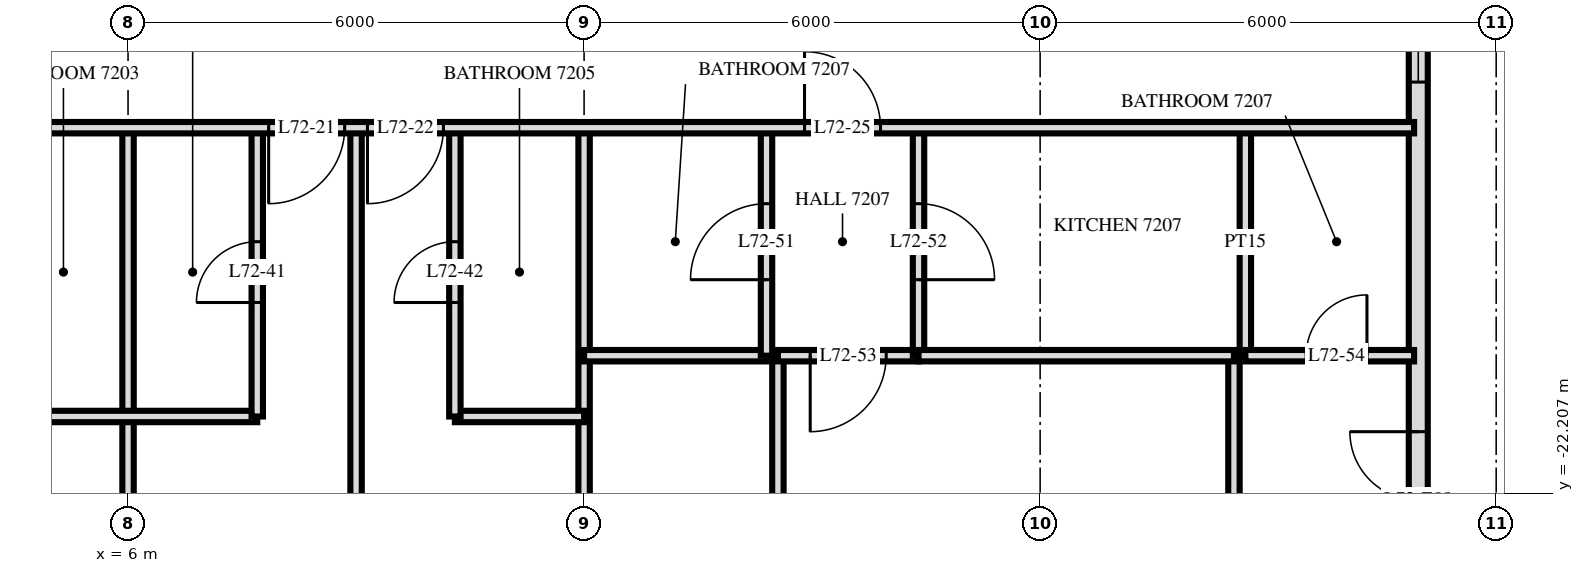
"""IFC4 building model, lengths in metres.
Left out: names, types, materials, properties, quantities, classifications, styles, units other than length and angle.
Written with IfcOpenShell. Run it as: python <this file> out.ifc"""

import sys

from ifc_helpers import new_model, si_unit, direction, frame, frame_2d, origin, place, context, subcontext, project, spatial, rectangle, extrude, element, fill, save


model = new_model("IFC4")
c1 = context("Model", 3, precision=1e-05, world=origin(), true_north=direction((0.0, 1.0)))
c2 = subcontext(c1, "Body", "Model", "MODEL_VIEW")
j1 = project(units=[si_unit("LENGTHUNIT", "METRE"), si_unit("PLANEANGLEUNIT", "RADIAN")], contexts=[c1])
p1 = place(None, origin())
s1 = spatial("IfcSite", under=j1, at=p1, CompositionType="ELEMENT")
p2 = place(p1, origin())
s2 = spatial("IfcBuilding", under=s1, at=p2, CompositionType="ELEMENT")
p3 = place(p2, frame((0.0, 0.0, 273.6)))
s3 = spatial("IfcBuildingStorey", under=s2, at=p3, CompositionType="ELEMENT", Elevation=273.6)
p4 = place(p3, frame((22.975, -29.275, 0.0), z_axis=(0.0, 0.0, 1.0), x_axis=(0.0, 1.0, 0.0)))
e1 = element("IfcWall", 1, at=p4, inside=s3, PredefinedType="SOLIDWALL", context=c2, shape_type="SweptSolid", body=[
    extrude(rectangle(XDim=25.951, YDim=0.25, at=frame_2d((12.975, 0.0))), origin(), (0.0, 0.0, 1.0), 3.22),
])
p5 = place(p4, frame((0.575, 0.0, 0.0)))
e2 = element("IfcOpeningElement", 2, at=p5, cuts=e1, PredefinedType="OPENING", context=c2, shape_type="SweptSolid", body=[
    extrude(rectangle(XDim=1.8, YDim=2.4, at=frame_2d((0.9, 1.2))), frame((0.0, 0.135, 0.0), z_axis=(0.0, -1.0, 0.0), x_axis=(1.0, 0.0, 0.0)), (0.0, 0.0, 1.0), 0.27),
])
p6 = place(p4, frame((3.325, 0.0, 0.9)))
e3 = element("IfcOpeningElement", 3, at=p6, cuts=e1, PredefinedType="OPENING", context=c2, shape_type="SweptSolid", body=[
    extrude(rectangle(XDim=1.8, YDim=1.5, at=frame_2d((0.9, 0.75))), frame((0.0, 0.135, 0.0), z_axis=(0.0, -1.0, 0.0), x_axis=(1.0, 0.0, 0.0)), (0.0, 0.0, 1.0), 0.27),
])
p7 = place(p4, frame((6.075, 0.0, 0.0)))
e4 = element("IfcOpeningElement", 4, at=p7, cuts=e1, PredefinedType="OPENING", context=c2, shape_type="SweptSolid", body=[
    extrude(rectangle(XDim=1.8, YDim=2.4, at=frame_2d((0.9, 1.2))), frame((0.0, 0.135, 0.0), z_axis=(0.0, -1.0, 0.0), x_axis=(1.0, 0.0, 0.0)), (0.0, 0.0, 1.0), 0.27),
])
p8 = place(p4, frame((12.475, 0.0, 0.9)))
e5 = element("IfcOpeningElement", 5, at=p8, cuts=e1, PredefinedType="OPENING", context=c2, shape_type="SweptSolid", body=[
    extrude(rectangle(XDim=1.2, YDim=1.5, at=frame_2d((0.6, 0.75))), frame((0.0, 0.135, 0.0), z_axis=(0.0, -1.0, 0.0), x_axis=(1.0, 0.0, 0.0)), (0.0, 0.0, 1.0), 0.27),
])
p9 = place(p4, frame((16.175, 0.0, 0.0)))
e6 = element("IfcOpeningElement", 6, at=p9, cuts=e1, PredefinedType="OPENING", context=c2, shape_type="SweptSolid", body=[
    extrude(rectangle(XDim=1.8, YDim=2.4, at=frame_2d((0.9, 1.2))), frame((0.0, 0.135, 0.0), z_axis=(0.0, -1.0, 0.0), x_axis=(1.0, 0.0, 0.0)), (0.0, 0.0, 1.0), 0.27),
])
p10 = place(p4, frame((20.925, 0.0, 0.0)))
e7 = element("IfcOpeningElement", 7, at=p10, cuts=e1, PredefinedType="OPENING", context=c2, shape_type="SweptSolid", body=[
    extrude(rectangle(XDim=1.8, YDim=2.4, at=frame_2d((0.9, 1.2))), frame((0.0, 0.135, 0.0), z_axis=(0.0, -1.0, 0.0), x_axis=(1.0, 0.0, 0.0)), (0.0, 0.0, 1.0), 0.27),
])
p11 = place(p3, frame((20.7, -20.4, 0.0), z_axis=(0.0, 0.0, 1.0), x_axis=(0.0, 1.0, 0.0)))
e8 = element("IfcWall", 8, at=p11, inside=s3, PredefinedType="PARTITIONING", context=c2, shape_type="SweptSolid", body=[
    extrude(rectangle(XDim=3.0, YDim=0.15, at=frame_2d((1.5, 0.0))), origin(), (0.0, 0.0, 1.0), 3.22),
])
p12 = place(p3, frame((20.55, -33.017, 0.0), z_axis=(0.0, 0.0, 1.0), x_axis=(0.0, 1.0, 0.0)))
e9 = element("IfcWall", 9, at=p12, inside=s3, PredefinedType="PARTITIONING", context=c2, shape_type="SweptSolid", body=[
    extrude(rectangle(XDim=12.617, YDim=0.15, at=frame_2d((6.308, 0.0))), origin(), (0.0, 0.0, 1.0), 3.22),
])
p13 = place(p12, frame((5.697, 0.0, 0.0)))
e10 = element("IfcOpeningElement", 10, at=p13, cuts=e9, PredefinedType="OPENING", context=c2, shape_type="SweptSolid", body=[
    extrude(rectangle(XDim=0.9, YDim=2.1, at=frame_2d((0.45, 1.05))), frame((0.0, 0.085, 0.0), z_axis=(0.0, -1.0, 0.0), x_axis=(1.0, 0.0, 0.0)), (0.0, 0.0, 1.0), 0.17),
])
p14 = place(p3, frame((16.4, -20.4, 0.0), z_axis=(0.0, 0.0, 1.0), x_axis=(0.0, 1.0, 0.0)))
e11 = element("IfcWall", 11, at=p14, inside=s3, PredefinedType="PARTITIONING", context=c2, shape_type="SweptSolid", body=[
    extrude(rectangle(XDim=3.0, YDim=0.15, at=frame_2d((1.5, 0.0))), origin(), (0.0, 0.0, 1.0), 3.22),
])
p15 = place(p14, frame((1.0, 0.0, 0.0)))
e12 = element("IfcOpeningElement", 12, at=p15, cuts=e11, PredefinedType="OPENING", context=c2, shape_type="SweptSolid", body=[
    extrude(rectangle(XDim=1.0, YDim=2.1, at=frame_2d((0.5, 1.05))), frame((0.0, 0.085, 0.0), z_axis=(0.0, -1.0, 0.0), x_axis=(1.0, 0.0, 0.0)), (0.0, 0.0, 1.0), 0.17),
])
p16 = place(p3, frame((14.55, -33.62, 0.0), z_axis=(0.0, 0.0, 1.0), x_axis=(0.0, 1.0, 0.0)))
e13 = element("IfcWall", 13, at=p16, inside=s3, PredefinedType="PARTITIONING", context=c2, shape_type="SweptSolid", body=[
    extrude(rectangle(XDim=13.22, YDim=0.15, at=frame_2d((6.61, 0.0))), origin(), (0.0, 0.0, 1.0), 3.22),
])
p17 = place(p16, frame((6.07, 0.0, 0.0)))
e14 = element("IfcOpeningElement", 14, at=p17, cuts=e13, PredefinedType="OPENING", context=c2, shape_type="SweptSolid", body=[
    extrude(rectangle(XDim=0.9, YDim=2.1, at=frame_2d((0.45, 1.05))), frame((0.0, 0.085, 0.0), z_axis=(0.0, -1.0, 0.0), x_axis=(1.0, 0.0, 0.0)), (0.0, 0.0, 1.0), 0.17),
])
p18 = place(p3, frame((14.4, -20.4, 0.0), z_axis=(0.0, 0.0, 1.0), x_axis=(0.0, 1.0, 0.0)))
e15 = element("IfcWall", 15, at=p18, inside=s3, PredefinedType="PARTITIONING", context=c2, shape_type="SweptSolid", body=[
    extrude(rectangle(XDim=3.0, YDim=0.15, at=frame_2d((1.5, 0.0))), origin(), (0.0, 0.0, 1.0), 3.22),
])
p19 = place(p18, frame((1.0, 0.0, 0.0)))
e16 = element("IfcOpeningElement", 16, at=p19, cuts=e15, PredefinedType="OPENING", context=c2, shape_type="SweptSolid", body=[
    extrude(rectangle(XDim=1.0, YDim=2.1, at=frame_2d((0.5, 1.05))), frame((0.0, 0.085, 0.0), z_axis=(0.0, -1.0, 0.0), x_axis=(1.0, 0.0, 0.0)), (0.0, 0.0, 1.0), 0.17),
])
p20 = place(p3, frame((12.0, -33.62, 0.0), z_axis=(0.0, 0.0, 1.0), x_axis=(0.0, 1.0, 0.0)))
e17 = element("IfcWall", 17, at=p20, inside=s3, PredefinedType="PARTITIONING", context=c2, shape_type="SweptSolid", body=[
    extrude(rectangle(XDim=16.22, YDim=0.15, at=frame_2d((8.11, 0.0))), origin(), (0.0, 0.0, 1.0), 3.22),
])
p21 = place(p3, frame((10.3, -21.2, 0.0), z_axis=(0.0, 0.0, 1.0), x_axis=(0.0, 1.0, 0.0)))
e18 = element("IfcWall", 18, at=p21, inside=s3, PredefinedType="PARTITIONING", context=c2, shape_type="SweptSolid", body=[
    extrude(rectangle(XDim=3.8, YDim=0.15, at=frame_2d((1.9, 0.0))), origin(), (0.0, 0.0, 1.0), 3.22),
])
p22 = place(p21, frame((1.5, 0.0, 0.0)))
e19 = element("IfcOpeningElement", 19, at=p22, cuts=e18, PredefinedType="OPENING", context=c2, shape_type="SweptSolid", body=[
    extrude(rectangle(XDim=0.8, YDim=2.1, at=frame_2d((0.4, 1.05))), frame((0.0, 0.085, 0.0), z_axis=(0.0, -1.0, 0.0), x_axis=(1.0, 0.0, 0.0)), (0.0, 0.0, 1.0), 0.17),
])
p23 = place(p3, frame((9.0, -33.62, 0.0), z_axis=(0.0, 0.0, 1.0), x_axis=(0.0, 1.0, 0.0)))
e20 = element("IfcWall", 20, at=p23, inside=s3, PredefinedType="PARTITIONING", context=c2, shape_type="SweptSolid", body=[
    extrude(rectangle(XDim=16.22, YDim=0.15, at=frame_2d((8.11, 0.0))), origin(), (0.0, 0.0, 1.0), 3.22),
])
p24 = place(p3, frame((7.7, -21.2, 0.0), z_axis=(0.0, 0.0, 1.0), x_axis=(0.0, 1.0, 0.0)))
e21 = element("IfcWall", 21, at=p24, inside=s3, PredefinedType="PARTITIONING", context=c2, shape_type="SweptSolid", body=[
    extrude(rectangle(XDim=3.8, YDim=0.15, at=frame_2d((1.9, 0.0))), origin(), (0.0, 0.0, 1.0), 3.22),
])
p25 = place(p24, frame((1.5, 0.0, 0.0)))
e22 = element("IfcOpeningElement", 22, at=p25, cuts=e21, PredefinedType="OPENING", context=c2, shape_type="SweptSolid", body=[
    extrude(rectangle(XDim=0.8, YDim=2.1, at=frame_2d((0.4, 1.05))), frame((0.0, 0.085, 0.0), z_axis=(0.0, -1.0, 0.0), x_axis=(1.0, 0.0, 0.0)), (0.0, 0.0, 1.0), 0.17),
])
p26 = place(p3, frame((6.0, -33.62, 0.0), z_axis=(0.0, 0.0, 1.0), x_axis=(0.0, 1.0, 0.0)))
e23 = element("IfcWall", 23, at=p26, inside=s3, PredefinedType="PARTITIONING", context=c2, shape_type="SweptSolid", body=[
    extrude(rectangle(XDim=16.22, YDim=0.15, at=frame_2d((8.11, 0.0))), origin(), (0.0, 0.0, 1.0), 3.22),
])
p27 = place(p3, frame((4.3, -21.2, 0.0), z_axis=(0.0, 0.0, 1.0), x_axis=(1.0, 0.0, 0.0)))
e24 = element("IfcWall", 24, at=p27, inside=s3, PredefinedType="PARTITIONING", context=c2, shape_type="SweptSolid", body=[
    extrude(rectangle(XDim=3.4, YDim=0.15, at=frame_2d((1.7, 0.0))), origin(), (0.0, 0.0, 1.0), 3.22),
])
p28 = place(p3, frame((10.3, -21.2, 0.0), z_axis=(0.0, 0.0, 1.0), x_axis=(1.0, 0.0, 0.0)))
e25 = element("IfcWall", 25, at=p28, inside=s3, PredefinedType="PARTITIONING", context=c2, shape_type="SweptSolid", body=[
    extrude(rectangle(XDim=1.7, YDim=0.15, at=frame_2d((0.85, 0.0))), origin(), (0.0, 0.0, 1.0), 3.22),
])
p29 = place(p3, frame((14.55, -20.4, 0.0), z_axis=(0.0, 0.0, 1.0), x_axis=(1.0, 0.0, 0.0)))
e26 = element("IfcWall", 26, at=p29, inside=s3, PredefinedType="PARTITIONING", context=c2, shape_type="SweptSolid", body=[
    extrude(rectangle(XDim=1.85, YDim=0.15, at=frame_2d((0.925, 0.0))), origin(), (0.0, 0.0, 1.0), 3.22),
])
p30 = place(p29, frame((0.425, 0.0, 0.0)))
e27 = element("IfcOpeningElement", 27, at=p30, cuts=e26, PredefinedType="OPENING", context=c2, shape_type="SweptSolid", body=[
    extrude(rectangle(XDim=1.0, YDim=2.1, at=frame_2d((0.5, 1.05))), frame((0.0, 0.085, 0.0), z_axis=(0.0, -1.0, 0.0), x_axis=(1.0, 0.0, 0.0)), (0.0, 0.0, 1.0), 0.17),
])
p31 = place(p3, frame((12.0, -20.4, 0.0), z_axis=(0.0, 0.0, 1.0), x_axis=(1.0, 0.0, 0.0)))
e28 = element("IfcWall", 28, at=p31, inside=s3, PredefinedType="PARTITIONING", context=c2, shape_type="SweptSolid", body=[
    extrude(rectangle(XDim=2.4, YDim=0.15, at=frame_2d((1.2, 0.0))), origin(), (0.0, 0.0, 1.0), 3.22),
])
p32 = place(p3, frame((16.4, -20.4, 0.0), z_axis=(0.0, 0.0, 1.0), x_axis=(1.0, 0.0, 0.0)))
e29 = element("IfcWall", 29, at=p32, inside=s3, PredefinedType="PARTITIONING", context=c2, shape_type="SweptSolid", body=[
    extrude(rectangle(XDim=4.15, YDim=0.15, at=frame_2d((2.075, 0.0))), origin(), (0.0, 0.0, 1.0), 3.22),
])
p33 = place(p3, frame((20.7, -20.4, 0.0), z_axis=(0.0, 0.0, 1.0), x_axis=(1.0, 0.0, 0.0)))
e30 = element("IfcWall", 30, at=p33, inside=s3, PredefinedType="PARTITIONING", context=c2, shape_type="SweptSolid", body=[
    extrude(rectangle(XDim=2.22, YDim=0.15, at=frame_2d((1.11, 0.0))), origin(), (0.0, 0.0, 1.0), 3.22),
])
p34 = place(p33, frame((0.8, 0.0, 0.0)))
e31 = element("IfcOpeningElement", 31, at=p34, cuts=e30, PredefinedType="OPENING", context=c2, shape_type="SweptSolid", body=[
    extrude(rectangle(XDim=0.8, YDim=2.1, at=frame_2d((0.4, 1.05))), frame((0.0, 0.085, 0.0), z_axis=(0.0, -1.0, 0.0), x_axis=(1.0, 0.0, 0.0)), (0.0, 0.0, 1.0), 0.17),
])
p35 = place(p3, frame((-22.92, -17.4, 0.0), z_axis=(0.0, 0.0, 1.0), x_axis=(1.0, 0.0, 0.0)))
e32 = element("IfcWall", 32, at=p35, inside=s3, PredefinedType="PARTITIONING", context=c2, shape_type="SweptSolid", body=[
    extrude(rectangle(XDim=45.84, YDim=0.15, at=frame_2d((22.92, 0.0))), origin(), (0.0, 0.0, 1.0), 3.22),
])
p36 = place(p35, frame((21.67, 0.0, 0.0)))
e33 = element("IfcOpeningElement", 33, at=p36, cuts=e32, PredefinedType="OPENING", context=c2, shape_type="SweptSolid", body=[
    extrude(rectangle(XDim=1.0, YDim=2.1, at=frame_2d((0.5, 1.05))), frame((0.0, 0.085, 0.0), z_axis=(0.0, -1.0, 0.0), x_axis=(1.0, 0.0, 0.0)), (0.0, 0.0, 1.0), 0.17),
])
p37 = place(p35, frame((24.77, 0.0, 0.0)))
e34 = element("IfcOpeningElement", 34, at=p37, cuts=e32, PredefinedType="OPENING", context=c2, shape_type="SweptSolid", body=[
    extrude(rectangle(XDim=1.0, YDim=2.1, at=frame_2d((0.5, 1.05))), frame((0.0, 0.085, 0.0), z_axis=(0.0, -1.0, 0.0), x_axis=(1.0, 0.0, 0.0)), (0.0, 0.0, 1.0), 0.17),
])
p38 = place(p35, frame((26.07, 0.0, 0.0)))
e35 = element("IfcOpeningElement", 35, at=p38, cuts=e32, PredefinedType="OPENING", context=c2, shape_type="SweptSolid", body=[
    extrude(rectangle(XDim=1.0, YDim=2.1, at=frame_2d((0.5, 1.05))), frame((0.0, 0.085, 0.0), z_axis=(0.0, -1.0, 0.0), x_axis=(1.0, 0.0, 0.0)), (0.0, 0.0, 1.0), 0.17),
])
p39 = place(p35, frame((30.77, 0.0, 0.0)))
e36 = element("IfcOpeningElement", 36, at=p39, cuts=e32, PredefinedType="OPENING", context=c2, shape_type="SweptSolid", body=[
    extrude(rectangle(XDim=1.0, YDim=2.1, at=frame_2d((0.5, 1.05))), frame((0.0, 0.085, 0.0), z_axis=(0.0, -1.0, 0.0), x_axis=(1.0, 0.0, 0.0)), (0.0, 0.0, 1.0), 0.17),
])
p40 = place(p35, frame((32.07, 0.0, 0.0)))
e37 = element("IfcOpeningElement", 37, at=p40, cuts=e32, PredefinedType="OPENING", context=c2, shape_type="SweptSolid", body=[
    extrude(rectangle(XDim=1.0, YDim=2.1, at=frame_2d((0.5, 1.05))), frame((0.0, 0.085, 0.0), z_axis=(0.0, -1.0, 0.0), x_axis=(1.0, 0.0, 0.0)), (0.0, 0.0, 1.0), 0.17),
])
p41 = place(p35, frame((9.42, 0.0, 0.0)))
e38 = element("IfcOpeningElement", 38, at=p41, cuts=e32, PredefinedType="OPENING", context=c2, shape_type="SweptSolid", body=[
    extrude(rectangle(XDim=1.0, YDim=2.1, at=frame_2d((0.5, 1.05))), frame((0.0, 0.085, 0.0), z_axis=(0.0, -1.0, 0.0), x_axis=(1.0, 0.0, 0.0)), (0.0, 0.0, 1.0), 0.17),
])
p42 = place(p35, frame((2.67, 0.0, 0.0)))
e39 = element("IfcOpeningElement", 39, at=p42, cuts=e32, PredefinedType="OPENING", context=c2, shape_type="SweptSolid", body=[
    extrude(rectangle(XDim=1.0, YDim=2.1, at=frame_2d((0.5, 1.05))), frame((0.0, 0.085, 0.0), z_axis=(0.0, -1.0, 0.0), x_axis=(1.0, 0.0, 0.0)), (0.0, 0.0, 1.0), 0.17),
])
p43 = place(p35, frame((37.82, 0.0, 0.0)))
e40 = element("IfcOpeningElement", 40, at=p43, cuts=e32, PredefinedType="OPENING", context=c2, shape_type="SweptSolid", body=[
    extrude(rectangle(XDim=1.0, YDim=2.1, at=frame_2d((0.5, 1.05))), frame((0.0, 0.085, 0.0), z_axis=(0.0, -1.0, 0.0), x_axis=(1.0, 0.0, 0.0)), (0.0, 0.0, 1.0), 0.17),
])
p44 = place(p7, origin())
e41 = element("IfcDoor", 41, at=p44, inside=s3, OperationType="DOUBLE_DOOR_SINGLE_SWING", PredefinedType="DOOR", context=c2, shape_type="SweptSolid", body=[
    extrude(rectangle(XDim=1.8, YDim=2.4, at=frame_2d((0.9, 1.2))), frame((0.0, 0.025, 0.0), z_axis=(0.0, -1.0, 0.0), x_axis=(1.0, 0.0, 0.0)), (0.0, 0.0, 1.0), 0.05),
])
fill(e4, e41)
p45 = place(p8, origin())
e42 = element("IfcWindow", 42, at=p45, inside=s3, PartitioningType="SINGLE_PANEL", PredefinedType="WINDOW", context=c2, shape_type="SweptSolid", body=[
    extrude(rectangle(XDim=1.2, YDim=1.5, at=frame_2d((0.6, 0.75))), frame((0.0, 0.03, 0.0), z_axis=(0.0, -1.0, 0.0), x_axis=(1.0, 0.0, 0.0)), (0.0, 0.0, 1.0), 0.06),
])
fill(e5, e42)
p46 = place(p39, frame((0.5, 0.0, 0.0), z_axis=(0.0, 0.0, 1.0), x_axis=(-1.0, 0.0, 0.0)))
e43 = element("IfcDoor", 43, at=p46, inside=s3, OperationType="SINGLE_SWING_LEFT", PredefinedType="DOOR", context=c2, shape_type="SweptSolid", body=[
    extrude(rectangle(XDim=1.0, YDim=2.1, at=frame_2d((0.0, 1.05))), frame((0.0, -0.025, 0.0), z_axis=(0.0, 1.0, 0.0), x_axis=(-1.0, 0.0, 0.0)), (0.0, 0.0, 1.0), 0.05),
])
fill(e36, e43)
p47 = place(p40, frame((0.5, 0.0, 0.0), z_axis=(0.0, 0.0, 1.0), x_axis=(-1.0, 0.0, 0.0)))
e44 = element("IfcDoor", 44, at=p47, inside=s3, OperationType="SINGLE_SWING_LEFT", PredefinedType="DOOR", context=c2, shape_type="SweptSolid", body=[
    extrude(rectangle(XDim=1.0, YDim=2.1, at=frame_2d((0.0, 1.05))), frame((0.0, -0.025, 0.0), z_axis=(0.0, 1.0, 0.0), x_axis=(-1.0, 0.0, 0.0)), (0.0, 0.0, 1.0), 0.05),
])
fill(e37, e44)
p48 = place(p43, origin())
e45 = element("IfcDoor", 45, at=p48, inside=s3, OperationType="SINGLE_SWING_RIGHT", PredefinedType="DOOR", context=c2, shape_type="SweptSolid", body=[
    extrude(rectangle(XDim=1.0, YDim=2.1, at=frame_2d((0.5, 1.05))), frame((0.0, 0.025, 0.0), z_axis=(0.0, -1.0, 0.0), x_axis=(1.0, 0.0, 0.0)), (0.0, 0.0, 1.0), 0.05),
])
fill(e40, e45)
p49 = place(p25, origin())
e46 = element("IfcDoor", 46, at=p49, inside=s3, OperationType="SINGLE_SWING_RIGHT", PredefinedType="DOOR", context=c2, shape_type="SweptSolid", body=[
    extrude(rectangle(XDim=0.8, YDim=2.1, at=frame_2d((0.4, 1.05))), frame((0.0, 0.025, 0.0), z_axis=(0.0, -1.0, 0.0), x_axis=(1.0, 0.0, 0.0)), (0.0, 0.0, 1.0), 0.05),
])
fill(e22, e46)
p50 = place(p22, origin())
e47 = element("IfcDoor", 47, at=p50, inside=s3, OperationType="SINGLE_SWING_RIGHT", PredefinedType="DOOR", context=c2, shape_type="SweptSolid", body=[
    extrude(rectangle(XDim=0.8, YDim=2.1, at=frame_2d((0.4, 1.05))), frame((0.0, 0.025, 0.0), z_axis=(0.0, -1.0, 0.0), x_axis=(1.0, 0.0, 0.0)), (0.0, 0.0, 1.0), 0.05),
])
fill(e19, e47)
p51 = place(p19, origin())
e48 = element("IfcDoor", 48, at=p51, inside=s3, OperationType="SINGLE_SWING_RIGHT", PredefinedType="DOOR", context=c2, shape_type="SweptSolid", body=[
    extrude(rectangle(XDim=1.0, YDim=2.1, at=frame_2d((0.5, 1.05))), frame((0.0, 0.025, 0.0), z_axis=(0.0, -1.0, 0.0), x_axis=(1.0, 0.0, 0.0)), (0.0, 0.0, 1.0), 0.05),
])
fill(e16, e48)
p52 = place(p15, frame((0.5, 0.0, 0.0), z_axis=(0.0, 0.0, 1.0), x_axis=(-1.0, 0.0, 0.0)))
e49 = element("IfcDoor", 49, at=p52, inside=s3, OperationType="SINGLE_SWING_LEFT", PredefinedType="DOOR", context=c2, shape_type="SweptSolid", body=[
    extrude(rectangle(XDim=1.0, YDim=2.1, at=frame_2d((0.0, 1.05))), frame((0.0, -0.025, 0.0), z_axis=(0.0, 1.0, 0.0), x_axis=(-1.0, 0.0, 0.0)), (0.0, 0.0, 1.0), 0.05),
])
fill(e12, e49)
p53 = place(p30, frame((0.5, 0.0, 0.0), z_axis=(0.0, 0.0, 1.0), x_axis=(-1.0, 0.0, 0.0)))
e50 = element("IfcDoor", 50, at=p53, inside=s3, OperationType="SINGLE_SWING_LEFT", PredefinedType="DOOR", context=c2, shape_type="SweptSolid", body=[
    extrude(rectangle(XDim=1.0, YDim=2.1, at=frame_2d((0.0, 1.05))), frame((0.0, -0.025, 0.0), z_axis=(0.0, 1.0, 0.0), x_axis=(-1.0, 0.0, 0.0)), (0.0, 0.0, 1.0), 0.05),
])
fill(e27, e50)
p54 = place(p34, origin())
e51 = element("IfcDoor", 51, at=p54, inside=s3, OperationType="SINGLE_SWING_LEFT", PredefinedType="DOOR", context=c2, shape_type="SweptSolid", body=[
    extrude(rectangle(XDim=0.8, YDim=2.1, at=frame_2d((0.4, 1.05))), frame((0.0, 0.025, 0.0), z_axis=(0.0, -1.0, 0.0), x_axis=(1.0, 0.0, 0.0)), (0.0, 0.0, 1.0), 0.05),
])
fill(e31, e51)
save(model, sys.argv[1])
